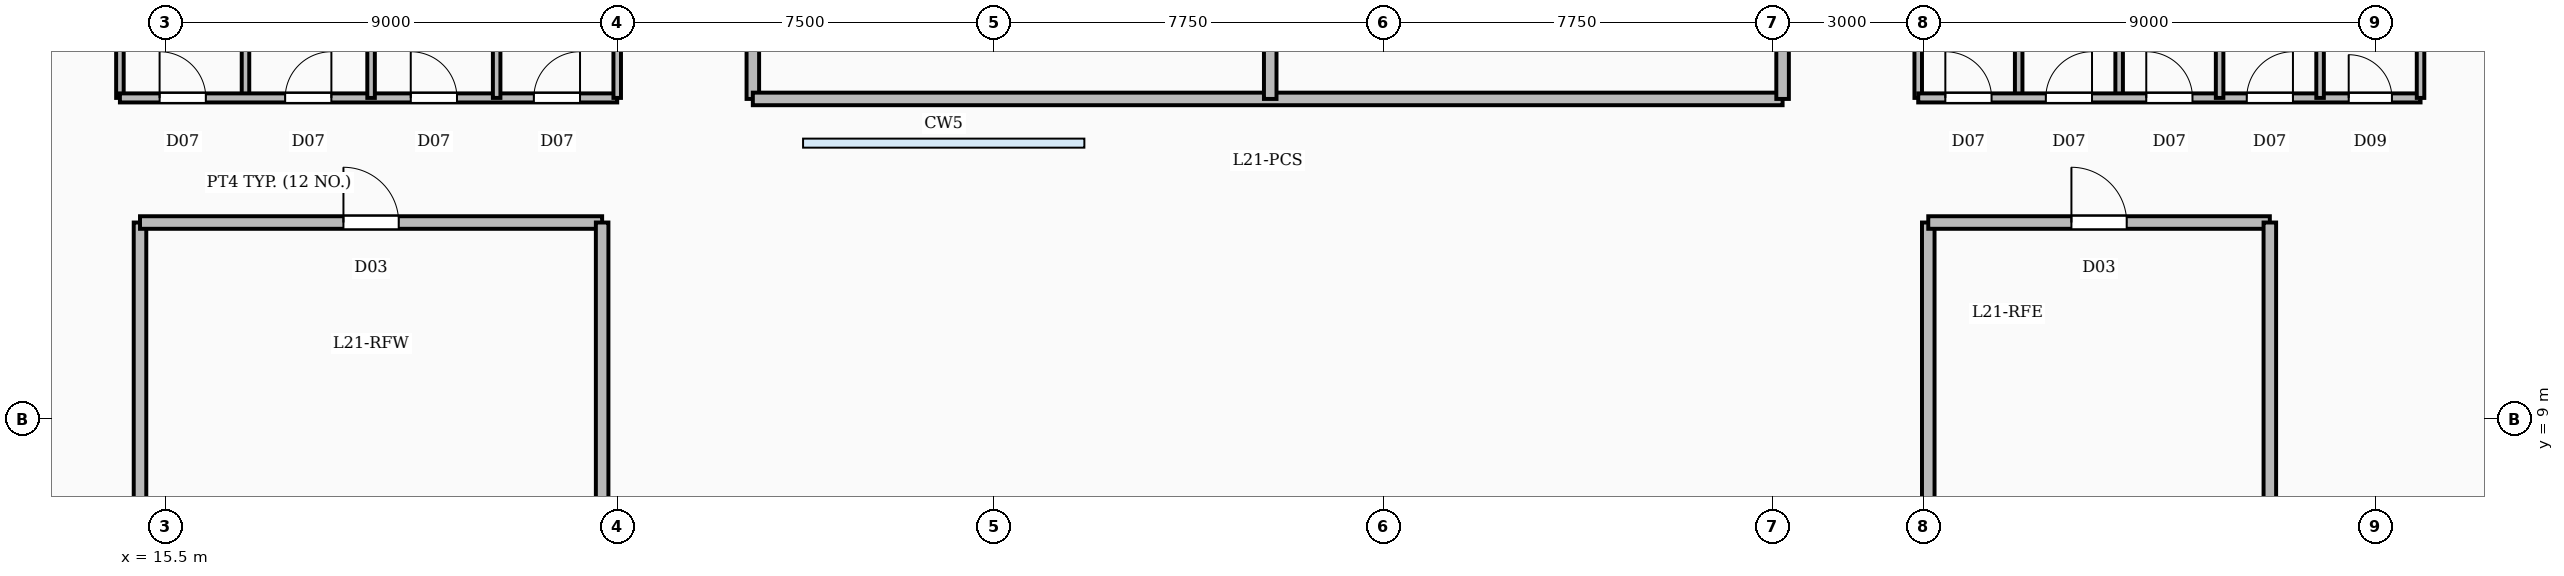
"""IFC4 building model, lengths in metres.
Left out: names, types, materials, properties, quantities, classifications, styles, units other than length and angle.
Written with IfcOpenShell. Run it as: python <this file> out.ifc"""

import sys

from ifc_helpers import new_model, si_unit, direction, frame, frame_2d, origin, origin_2d, place, context, subcontext, project, spatial, rectangle, circle, extrude, element, fill, save


model = new_model("IFC4")
c1 = context("Model", 3, precision=1e-05, world=origin(), true_north=direction((0.0, 1.0)))
c2 = subcontext(c1, "Body", "Model", "MODEL_VIEW")
j1 = project(units=[si_unit("LENGTHUNIT", "METRE"), si_unit("PLANEANGLEUNIT", "RADIAN")], contexts=[c1])
p1 = place(None, origin())
s1 = spatial("IfcSite", under=j1, at=p1, CompositionType="ELEMENT")
p2 = place(p1, origin())
s2 = spatial("IfcBuilding", under=s1, at=p2, CompositionType="ELEMENT")
p3 = place(p2, frame((0.0, 0.0, 94.5)))
s3 = spatial("IfcBuildingStorey", under=s2, at=p3, CompositionType="ELEMENT", Elevation=94.5)
p4 = place(p3, frame((37.0, 3.15, 0.233), z_axis=(0.760462048907, 0.502575711343, 0.411236095863), x_axis=(-0.551354685646, 0.834270945566, 0.0)))
e1 = element("IfcColumn", 1, at=p4, inside=s3, PredefinedType="COLUMN", context=c2, shape_type="SweptSolid", body=[
    extrude(circle(Radius=0.69, at=origin_2d()), origin(), (0.0, 0.0, 1.0), 9.398),
])
p5 = place(p3, frame((52.25, 3.15, 0.226), z_axis=(0.599702599661, 0.676792244044, 0.426976639129), x_axis=(-0.748446527269, 0.663195141582, 0.0)))
e2 = element("IfcColumn", 2, at=p5, inside=s3, PredefinedType="COLUMN", context=c2, shape_type="SweptSolid", body=[
    extrude(circle(Radius=0.69, at=origin_2d()), origin(), (0.0, 0.0, 1.0), 9.083),
])
for number, where, z_axis, x_axis in (
    (3, (17.1, 15.4, 0.0), (0.0, 0.0, 1.0), (0.0, 1.0, 0.0)),
    (4, (19.6, 15.4, 0.0), (0.0, 0.0, 1.0), (0.0, 1.0, 0.0)),
    (5, (22.1, 15.4, 0.0), (0.0, 0.0, 1.0), (0.0, 1.0, 0.0)),
):
    element("IfcWall", number, at=place(p3, frame(where, z_axis=z_axis, x_axis=x_axis)), inside=s3, PredefinedType="PARTITIONING", context=c2, shape_type="SweptSolid", body=[
        extrude(rectangle(XDim=3.58, YDim=0.15, at=frame_2d((1.79, 0.0))), origin(), (0.0, 0.0, 1.0), 3.81),
    ])
p6 = place(p3, frame((14.6, 15.4, 0.0), z_axis=(0.0, 0.0, 1.0), x_axis=(1.0, 0.0, 0.0)))
e6 = element("IfcWall", 6, at=p6, inside=s3, PredefinedType="PARTITIONING", context=c2, shape_type="SweptSolid", body=[
    extrude(rectangle(XDim=9.9, YDim=0.18, at=frame_2d((4.95, 0.0))), origin(), (0.0, 0.0, 1.0), 3.81),
])
p7 = place(p6, frame((0.79, 0.0, 0.0)))
e7 = element("IfcOpeningElement", 7, at=p7, cuts=e6, PredefinedType="OPENING", context=c2, shape_type="SweptSolid", body=[
    extrude(rectangle(XDim=0.92, YDim=2.1, at=frame_2d((0.46, 1.05))), frame((0.0, 0.1, 0.0), z_axis=(0.0, -1.0, 0.0), x_axis=(1.0, 0.0, 0.0)), (0.0, 0.0, 1.0), 0.2),
])
p8 = place(p6, frame((3.29, 0.0, 0.0)))
e8 = element("IfcOpeningElement", 8, at=p8, cuts=e6, PredefinedType="OPENING", context=c2, shape_type="SweptSolid", body=[
    extrude(rectangle(XDim=0.92, YDim=2.1, at=frame_2d((0.46, 1.05))), frame((0.0, 0.1, 0.0), z_axis=(0.0, -1.0, 0.0), x_axis=(1.0, 0.0, 0.0)), (0.0, 0.0, 1.0), 0.2),
])
p9 = place(p6, frame((5.79, 0.0, 0.0)))
e9 = element("IfcOpeningElement", 9, at=p9, cuts=e6, PredefinedType="OPENING", context=c2, shape_type="SweptSolid", body=[
    extrude(rectangle(XDim=0.92, YDim=2.1, at=frame_2d((0.46, 1.05))), frame((0.0, 0.1, 0.0), z_axis=(0.0, -1.0, 0.0), x_axis=(1.0, 0.0, 0.0)), (0.0, 0.0, 1.0), 0.2),
])
p10 = place(p6, frame((8.24, 0.0, 0.0)))
e10 = element("IfcOpeningElement", 10, at=p10, cuts=e6, PredefinedType="OPENING", context=c2, shape_type="SweptSolid", body=[
    extrude(rectangle(XDim=0.92, YDim=2.1, at=frame_2d((0.46, 1.05))), frame((0.0, 0.1, 0.0), z_axis=(0.0, -1.0, 0.0), x_axis=(1.0, 0.0, 0.0)), (0.0, 0.0, 1.0), 0.2),
])
p11 = place(p3, frame((14.6, 15.4, 0.0), z_axis=(0.0, 0.0, 1.0), x_axis=(0.0, 1.0, 0.0)))
e11 = element("IfcWall", 11, at=p11, inside=s3, PredefinedType="PARTITIONING", context=c2, shape_type="SweptSolid", body=[
    extrude(rectangle(XDim=3.58, YDim=0.15, at=frame_2d((1.79, 0.0))), origin(), (0.0, 0.0, 1.0), 2.8),
])
for number, where, z_axis, x_axis in (
    (12, (24.5, 15.4, 0.0), (0.0, 0.0, 1.0), (0.0, 1.0, 0.0)),
    (13, (52.4, 15.4, 0.0), (0.0, 0.0, 1.0), (0.0, 1.0, 0.0)),
    (14, (54.4, 15.4, 0.0), (0.0, 0.0, 1.0), (0.0, 1.0, 0.0)),
    (15, (56.4, 15.4, 0.0), (0.0, 0.0, 1.0), (0.0, 1.0, 0.0)),
    (16, (58.4, 15.4, 0.0), (0.0, 0.0, 1.0), (0.0, 1.0, 0.0)),
):
    element("IfcWall", number, at=place(p3, frame(where, z_axis=z_axis, x_axis=x_axis)), inside=s3, PredefinedType="PARTITIONING", context=c2, shape_type="SweptSolid", body=[
        extrude(rectangle(XDim=3.58, YDim=0.15, at=frame_2d((1.79, 0.0))), origin(), (0.0, 0.0, 1.0), 3.81),
    ])
p12 = place(p3, frame((50.4, 15.4, 0.0), z_axis=(0.0, 0.0, 1.0), x_axis=(1.0, 0.0, 0.0)))
e17 = element("IfcWall", 17, at=p12, inside=s3, PredefinedType="SOLIDWALL", context=c2, shape_type="SweptSolid", body=[
    extrude(rectangle(XDim=10.0, YDim=0.18, at=frame_2d((5.0, 0.0))), origin(), (0.0, 0.0, 1.0), 3.81),
])
p13 = place(p12, frame((0.54, 0.0, 0.0)))
e18 = element("IfcOpeningElement", 18, at=p13, cuts=e17, PredefinedType="OPENING", context=c2, shape_type="SweptSolid", body=[
    extrude(rectangle(XDim=0.92, YDim=2.1, at=frame_2d((0.46, 1.05))), frame((0.0, 0.1, 0.0), z_axis=(0.0, -1.0, 0.0), x_axis=(1.0, 0.0, 0.0)), (0.0, 0.0, 1.0), 0.2),
])
p14 = place(p12, frame((2.54, 0.0, 0.0)))
e19 = element("IfcOpeningElement", 19, at=p14, cuts=e17, PredefinedType="OPENING", context=c2, shape_type="SweptSolid", body=[
    extrude(rectangle(XDim=0.92, YDim=2.1, at=frame_2d((0.46, 1.05))), frame((0.0, 0.1, 0.0), z_axis=(0.0, -1.0, 0.0), x_axis=(1.0, 0.0, 0.0)), (0.0, 0.0, 1.0), 0.2),
])
p15 = place(p12, frame((4.54, 0.0, 0.0)))
e20 = element("IfcOpeningElement", 20, at=p15, cuts=e17, PredefinedType="OPENING", context=c2, shape_type="SweptSolid", body=[
    extrude(rectangle(XDim=0.92, YDim=2.1, at=frame_2d((0.46, 1.05))), frame((0.0, 0.1, 0.0), z_axis=(0.0, -1.0, 0.0), x_axis=(1.0, 0.0, 0.0)), (0.0, 0.0, 1.0), 0.2),
])
p16 = place(p12, frame((6.54, 0.0, 0.0)))
e21 = element("IfcOpeningElement", 21, at=p16, cuts=e17, PredefinedType="OPENING", context=c2, shape_type="SweptSolid", body=[
    extrude(rectangle(XDim=0.92, YDim=2.1, at=frame_2d((0.46, 1.05))), frame((0.0, 0.1, 0.0), z_axis=(0.0, -1.0, 0.0), x_axis=(1.0, 0.0, 0.0)), (0.0, 0.0, 1.0), 0.2),
])
p17 = place(p12, frame((8.57, 0.0, 0.0)))
e22 = element("IfcOpeningElement", 22, at=p17, cuts=e17, PredefinedType="OPENING", context=c2, shape_type="SweptSolid", body=[
    extrude(rectangle(XDim=0.86, YDim=2.05, at=frame_2d((0.43, 1.025))), frame((0.0, 0.1, 0.0), z_axis=(0.0, -1.0, 0.0), x_axis=(1.0, 0.0, 0.0)), (0.0, 0.0, 1.0), 0.2),
])
p18 = place(p3, frame((50.4, 15.4, 0.0), z_axis=(0.0, 0.0, 1.0), x_axis=(0.0, 1.0, 0.0)))
e23 = element("IfcWall", 23, at=p18, inside=s3, PredefinedType="PARTITIONING", context=c2, shape_type="SweptSolid", body=[
    extrude(rectangle(XDim=3.58, YDim=0.15, at=frame_2d((1.79, 0.0))), origin(), (0.0, 0.0, 1.0), 3.81),
])
p19 = place(p3, frame((60.4, 15.4, 0.0), z_axis=(0.0, 0.0, 1.0), x_axis=(0.0, 1.0, 0.0)))
e24 = element("IfcWall", 24, at=p19, inside=s3, PredefinedType="PARTITIONING", context=c2, shape_type="SweptSolid", body=[
    extrude(rectangle(XDim=3.58, YDim=0.15, at=frame_2d((1.79, 0.0))), origin(), (0.0, 0.0, 1.0), 2.8),
])
p20 = place(p3, frame((37.5, 15.38, 0.0), z_axis=(0.0, 0.0, 1.0), x_axis=(0.0, 1.0, 0.0)))
e25 = element("IfcWall", 25, at=p20, inside=s3, PredefinedType="SOLIDWALL", context=c2, shape_type="SweptSolid", body=[
    extrude(rectangle(XDim=20.84, YDim=0.25, at=frame_2d((10.42, 0.0))), origin(), (0.0, 0.0, 1.0), 3.81),
])
p21 = place(p3, frame((27.2, 15.38, 0.0), z_axis=(0.0, 0.0, 1.0), x_axis=(1.0, 0.0, 0.0)))
e26 = element("IfcWall", 26, at=p21, inside=s3, PredefinedType="SOLIDWALL", context=c2, shape_type="SweptSolid", body=[
    extrude(rectangle(XDim=20.5, YDim=0.25, at=frame_2d((10.25, 0.0))), origin(), (0.0, 0.0, 1.0), 3.81),
])
p22 = place(p3, frame((27.2, 15.38, 0.0), z_axis=(0.0, 0.0, 1.0), x_axis=(0.0, 1.0, 0.0)))
e27 = element("IfcWall", 27, at=p22, inside=s3, PredefinedType="SOLIDWALL", context=c2, shape_type="SweptSolid", body=[
    extrude(rectangle(XDim=20.84, YDim=0.25, at=frame_2d((10.42, 0.0))), origin(), (0.0, 0.0, 1.0), 3.81),
])
p23 = place(p22, frame((4.8, 0.0, 0.0)))
e28 = element("IfcOpeningElement", 28, at=p23, cuts=e27, PredefinedType="OPENING", context=c2, shape_type="SweptSolid", body=[
    extrude(rectangle(XDim=1.2, YDim=2.2, at=frame_2d((0.6, 1.1))), frame((0.0, 0.135, 0.0), z_axis=(0.0, -1.0, 0.0), x_axis=(1.0, 0.0, 0.0)), (0.0, 0.0, 1.0), 0.27),
])
p24 = place(p22, frame((14.5, 0.0, 0.0)))
e29 = element("IfcOpeningElement", 29, at=p24, cuts=e27, PredefinedType="OPENING", context=c2, shape_type="SweptSolid", body=[
    extrude(rectangle(XDim=1.2, YDim=2.2, at=frame_2d((0.6, 1.1))), frame((0.0, 0.135, 0.0), z_axis=(0.0, -1.0, 0.0), x_axis=(1.0, 0.0, 0.0)), (0.0, 0.0, 1.0), 0.27),
])
p25 = place(p3, frame((47.7, 15.38, 0.0), z_axis=(0.0, 0.0, 1.0), x_axis=(0.0, 1.0, 0.0)))
e30 = element("IfcWall", 30, at=p25, inside=s3, PredefinedType="SOLIDWALL", context=c2, shape_type="SweptSolid", body=[
    extrude(rectangle(XDim=20.84, YDim=0.25, at=frame_2d((10.42, 0.0))), origin(), (0.0, 0.0, 1.0), 3.81),
])
p26 = place(p25, frame((4.8, 0.0, 0.0)))
e31 = element("IfcOpeningElement", 31, at=p26, cuts=e30, PredefinedType="OPENING", context=c2, shape_type="SweptSolid", body=[
    extrude(rectangle(XDim=1.2, YDim=2.2, at=frame_2d((0.6, 1.1))), frame((0.0, 0.135, 0.0), z_axis=(0.0, -1.0, 0.0), x_axis=(1.0, 0.0, 0.0)), (0.0, 0.0, 1.0), 0.27),
])
p27 = place(p25, frame((14.5, 0.0, 0.0)))
e32 = element("IfcOpeningElement", 32, at=p27, cuts=e30, PredefinedType="OPENING", context=c2, shape_type="SweptSolid", body=[
    extrude(rectangle(XDim=1.2, YDim=2.2, at=frame_2d((0.6, 1.1))), frame((0.0, 0.135, 0.0), z_axis=(0.0, -1.0, 0.0), x_axis=(1.0, 0.0, 0.0)), (0.0, 0.0, 1.0), 0.27),
])
p28 = place(p3, frame((15.0, 12.92, 0.0), z_axis=(0.0, 0.0, 1.0), x_axis=(1.0, 0.0, 0.0)))
e33 = element("IfcWall", 33, at=p28, inside=s3, PredefinedType="SOLIDWALL", context=c2, shape_type="SweptSolid", body=[
    extrude(rectangle(XDim=9.2, YDim=0.25, at=frame_2d((4.6, 0.0))), origin(), (0.0, 0.0, 1.0), 3.81),
])
p29 = place(p28, frame((4.05, 0.0, 0.0)))
e34 = element("IfcOpeningElement", 34, at=p29, cuts=e33, PredefinedType="OPENING", context=c2, shape_type="SweptSolid", body=[
    extrude(rectangle(XDim=1.1, YDim=2.15, at=frame_2d((0.55, 1.075))), frame((0.0, 0.135, 0.0), z_axis=(0.0, -1.0, 0.0), x_axis=(1.0, 0.0, 0.0)), (0.0, 0.0, 1.0), 0.27),
])
for number, where, z_axis, x_axis in (
    (35, (15.0, 3.06, 0.0), (0.0, 0.0, 1.0), (0.0, 1.0, 0.0)),
    (36, (24.2, 3.06, 0.0), (0.0, 0.0, 1.0), (0.0, 1.0, 0.0)),
):
    element("IfcWall", number, at=place(p3, frame(where, z_axis=z_axis, x_axis=x_axis)), inside=s3, PredefinedType="SOLIDWALL", context=c2, shape_type="SweptSolid", body=[
        extrude(rectangle(XDim=9.86, YDim=0.25, at=frame_2d((4.93, 0.0))), origin(), (0.0, 0.0, 1.0), 3.81),
    ])
p30 = place(p3, frame((50.6, 12.92, 0.0), z_axis=(0.0, 0.0, 1.0), x_axis=(1.0, 0.0, 0.0)))
e37 = element("IfcWall", 37, at=p30, inside=s3, PredefinedType="SOLIDWALL", context=c2, shape_type="SweptSolid", body=[
    extrude(rectangle(XDim=6.8, YDim=0.25, at=frame_2d((3.4, 0.0))), origin(), (0.0, 0.0, 1.0), 3.81),
])
p31 = place(p30, frame((2.85, 0.0, 0.0)))
e38 = element("IfcOpeningElement", 38, at=p31, cuts=e37, PredefinedType="OPENING", context=c2, shape_type="SweptSolid", body=[
    extrude(rectangle(XDim=1.1, YDim=2.15, at=frame_2d((0.55, 1.075))), frame((0.0, 0.135, 0.0), z_axis=(0.0, -1.0, 0.0), x_axis=(1.0, 0.0, 0.0)), (0.0, 0.0, 1.0), 0.27),
])
p32 = place(p3, frame((50.6, 3.06, 0.0), z_axis=(0.0, 0.0, 1.0), x_axis=(0.0, 1.0, 0.0)))
e39 = element("IfcWall", 39, at=p32, inside=s3, PredefinedType="SOLIDWALL", context=c2, shape_type="SweptSolid", body=[
    extrude(rectangle(XDim=9.86, YDim=0.25, at=frame_2d((4.93, 0.0))), origin(), (0.0, 0.0, 1.0), 3.81),
])
p33 = place(p3, frame((57.4, 3.06, 0.0), z_axis=(0.0, 0.0, 1.0), x_axis=(0.0, 1.0, 0.0)))
e40 = element("IfcWall", 40, at=p33, inside=s3, PredefinedType="SOLIDWALL", context=c2, shape_type="SweptSolid", body=[
    extrude(rectangle(XDim=9.86, YDim=0.25, at=frame_2d((4.93, 0.0))), origin(), (0.0, 0.0, 1.0), 2.8),
])
p34 = place(p7, origin())
e41 = element("IfcDoor", 41, at=p34, inside=s3, OperationType="SINGLE_SWING_LEFT", PredefinedType="DOOR", context=c2, shape_type="SweptSolid", body=[
    extrude(rectangle(XDim=0.92, YDim=2.1, at=frame_2d((0.46, 1.05))), frame((0.0, 0.025, 0.0), z_axis=(0.0, -1.0, 0.0), x_axis=(1.0, 0.0, 0.0)), (0.0, 0.0, 1.0), 0.05),
])
fill(e7, e41)
p35 = place(p8, origin())
e42 = element("IfcDoor", 42, at=p35, inside=s3, OperationType="SINGLE_SWING_RIGHT", PredefinedType="DOOR", context=c2, shape_type="SweptSolid", body=[
    extrude(rectangle(XDim=0.92, YDim=2.1, at=frame_2d((0.46, 1.05))), frame((0.0, 0.025, 0.0), z_axis=(0.0, -1.0, 0.0), x_axis=(1.0, 0.0, 0.0)), (0.0, 0.0, 1.0), 0.05),
])
fill(e8, e42)
p36 = place(p9, origin())
e43 = element("IfcDoor", 43, at=p36, inside=s3, OperationType="SINGLE_SWING_LEFT", PredefinedType="DOOR", context=c2, shape_type="SweptSolid", body=[
    extrude(rectangle(XDim=0.92, YDim=2.1, at=frame_2d((0.46, 1.05))), frame((0.0, 0.025, 0.0), z_axis=(0.0, -1.0, 0.0), x_axis=(1.0, 0.0, 0.0)), (0.0, 0.0, 1.0), 0.05),
])
fill(e9, e43)
p37 = place(p10, origin())
e44 = element("IfcDoor", 44, at=p37, inside=s3, OperationType="SINGLE_SWING_RIGHT", PredefinedType="DOOR", context=c2, shape_type="SweptSolid", body=[
    extrude(rectangle(XDim=0.92, YDim=2.1, at=frame_2d((0.46, 1.05))), frame((0.0, 0.025, 0.0), z_axis=(0.0, -1.0, 0.0), x_axis=(1.0, 0.0, 0.0)), (0.0, 0.0, 1.0), 0.05),
])
fill(e10, e44)
p38 = place(p13, origin())
e45 = element("IfcDoor", 45, at=p38, inside=s3, OperationType="SINGLE_SWING_LEFT", PredefinedType="DOOR", context=c2, shape_type="SweptSolid", body=[
    extrude(rectangle(XDim=0.92, YDim=2.1, at=frame_2d((0.46, 1.05))), frame((0.0, 0.025, 0.0), z_axis=(0.0, -1.0, 0.0), x_axis=(1.0, 0.0, 0.0)), (0.0, 0.0, 1.0), 0.05),
])
fill(e18, e45)
p39 = place(p14, origin())
e46 = element("IfcDoor", 46, at=p39, inside=s3, OperationType="SINGLE_SWING_RIGHT", PredefinedType="DOOR", context=c2, shape_type="SweptSolid", body=[
    extrude(rectangle(XDim=0.92, YDim=2.1, at=frame_2d((0.46, 1.05))), frame((0.0, 0.025, 0.0), z_axis=(0.0, -1.0, 0.0), x_axis=(1.0, 0.0, 0.0)), (0.0, 0.0, 1.0), 0.05),
])
fill(e19, e46)
p40 = place(p15, origin())
e47 = element("IfcDoor", 47, at=p40, inside=s3, OperationType="SINGLE_SWING_LEFT", PredefinedType="DOOR", context=c2, shape_type="SweptSolid", body=[
    extrude(rectangle(XDim=0.92, YDim=2.1, at=frame_2d((0.46, 1.05))), frame((0.0, 0.025, 0.0), z_axis=(0.0, -1.0, 0.0), x_axis=(1.0, 0.0, 0.0)), (0.0, 0.0, 1.0), 0.05),
])
fill(e20, e47)
p41 = place(p16, origin())
e48 = element("IfcDoor", 48, at=p41, inside=s3, OperationType="SINGLE_SWING_RIGHT", PredefinedType="DOOR", context=c2, shape_type="SweptSolid", body=[
    extrude(rectangle(XDim=0.92, YDim=2.1, at=frame_2d((0.46, 1.05))), frame((0.0, 0.025, 0.0), z_axis=(0.0, -1.0, 0.0), x_axis=(1.0, 0.0, 0.0)), (0.0, 0.0, 1.0), 0.05),
])
fill(e21, e48)
p42 = place(p17, origin())
e49 = element("IfcDoor", 49, at=p42, inside=s3, OperationType="SINGLE_SWING_LEFT", PredefinedType="DOOR", context=c2, shape_type="SweptSolid", body=[
    extrude(rectangle(XDim=0.86, YDim=2.05, at=frame_2d((0.43, 1.025))), frame((0.0, 0.025, 0.0), z_axis=(0.0, -1.0, 0.0), x_axis=(1.0, 0.0, 0.0)), (0.0, 0.0, 1.0), 0.05),
])
fill(e22, e49)
p43 = place(p29, origin())
e50 = element("IfcDoor", 50, at=p43, inside=s3, OperationType="SINGLE_SWING_LEFT", PredefinedType="DOOR", context=c2, shape_type="SweptSolid", body=[
    extrude(rectangle(XDim=1.1, YDim=2.15, at=frame_2d((0.55, 1.075))), frame((0.0, 0.025, 0.0), z_axis=(0.0, -1.0, 0.0), x_axis=(1.0, 0.0, 0.0)), (0.0, 0.0, 1.0), 0.05),
])
fill(e34, e50)
p44 = place(p31, origin())
e51 = element("IfcDoor", 51, at=p44, inside=s3, OperationType="SINGLE_SWING_LEFT", PredefinedType="DOOR", context=c2, shape_type="SweptSolid", body=[
    extrude(rectangle(XDim=1.1, YDim=2.15, at=frame_2d((0.55, 1.075))), frame((0.0, 0.025, 0.0), z_axis=(0.0, -1.0, 0.0), x_axis=(1.0, 0.0, 0.0)), (0.0, 0.0, 1.0), 0.05),
])
fill(e38, e51)
save(model, sys.argv[1])
